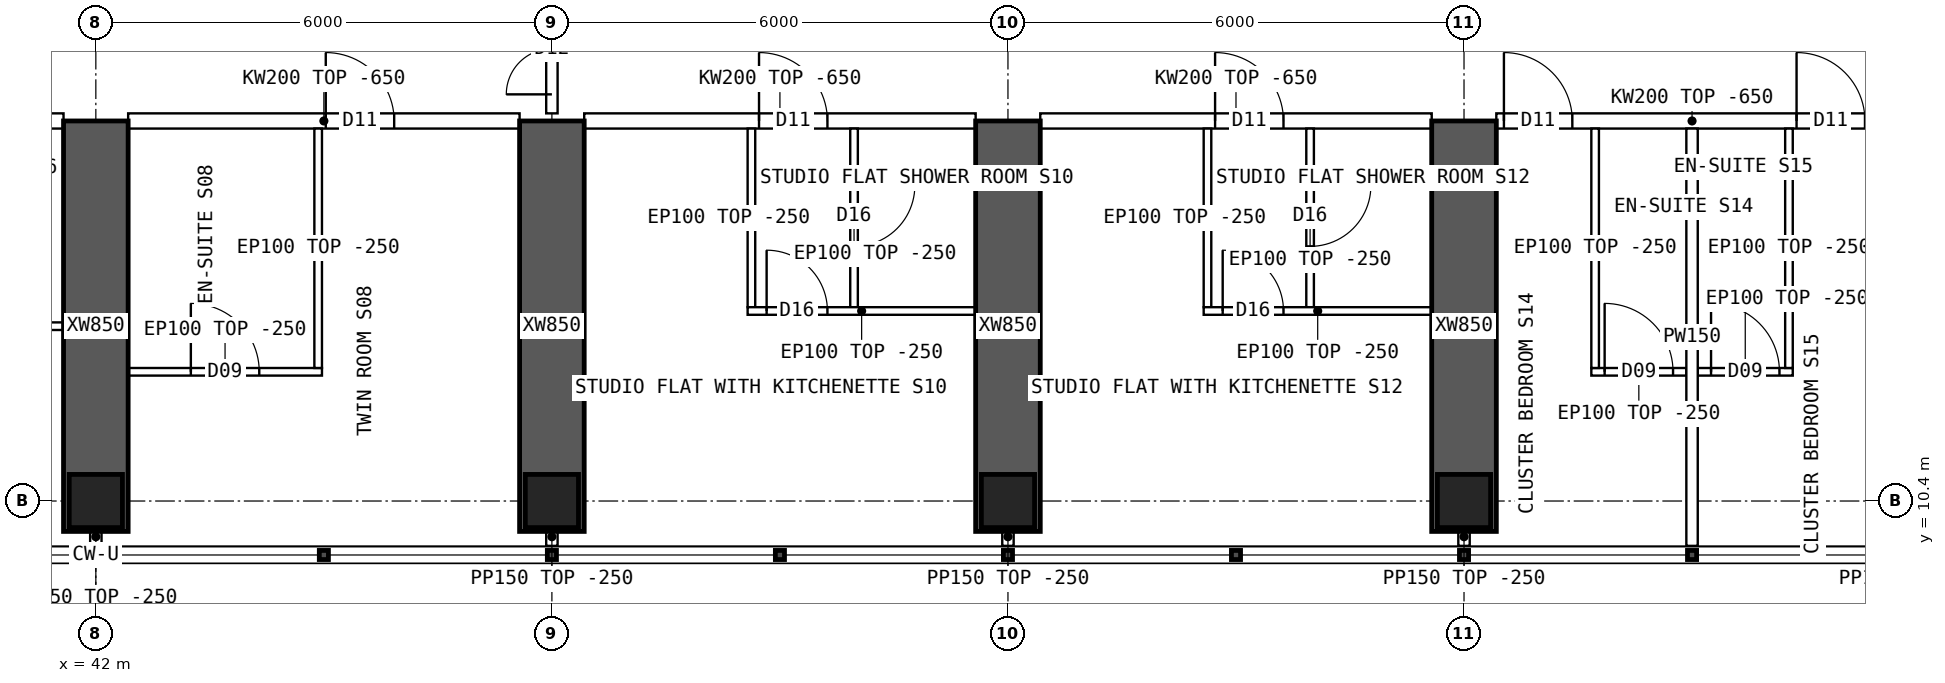
"""IFC4 building model, lengths in metres.
Left out: names, types, materials, properties, quantities, classifications, styles, units other than length and angle.
Written with IfcOpenShell. Run it as: python <this file> out.ifc"""

import sys

from ifc_helpers import new_model, si_unit, direction, frame, frame_2d, origin, origin_2d, place, context, subcontext, project, spatial, polyline, rectangle, hollow_rectangle, outline, extrude, element, fill, save


model = new_model("IFC4")
c1 = context("Model", 3, precision=1e-05, world=origin(), true_north=direction((0.0, 1.0)))
c2 = subcontext(c1, "Body", "Model", "MODEL_VIEW")
j1 = project(units=[si_unit("LENGTHUNIT", "METRE"), si_unit("PLANEANGLEUNIT", "RADIAN")], contexts=[c1])
p1 = place(None, origin())
s1 = spatial("IfcSite", under=j1, at=p1, CompositionType="ELEMENT")
p2 = place(p1, origin())
s2 = spatial("IfcBuilding", under=s1, at=p2, CompositionType="ELEMENT")
p3 = place(p2, frame((0.0, 0.0, 186.1)))
s3 = spatial("IfcBuildingStorey", under=s2, at=p3, CompositionType="ELEMENT", Elevation=186.1)
for number, where, z_axis, x_axis in (
    (1, (42.0, 10.4, 0.0), (0.0, 0.0, 1.0), (1.0, 0.0, 0.0)),
    (2, (48.0, 10.4, 0.0), (0.0, 0.0, 1.0), (1.0, 0.0, 0.0)),
    (3, (54.0, 10.4, 0.0), (0.0, 0.0, 1.0), (1.0, 0.0, 0.0)),
    (4, (60.0, 10.4, 0.0), (0.0, 0.0, 1.0), (1.0, 0.0, 0.0)),
):
    element("IfcColumn", number, at=place(p3, frame(where, z_axis=z_axis, x_axis=x_axis)), inside=s3, PredefinedType="COLUMN", context=c2, shape_type="SweptSolid", body=[
        extrude(hollow_rectangle(XDim=0.7, YDim=0.7, WallThickness=0.07, at=origin_2d()), origin(), (0.0, 0.0, 1.0), 3.75),
    ])
for number, where, z_axis, x_axis in (
    (5, (42.0, 10.0, 0.0), (0.0, 0.0, 1.0), (0.0, 1.0, 0.0)),
    (6, (48.0, 10.0, 0.0), (0.0, 0.0, 1.0), (0.0, 1.0, 0.0)),
    (7, (54.0, 10.0, 0.0), (0.0, 0.0, 1.0), (0.0, 1.0, 0.0)),
    (8, (60.0, 10.0, 0.0), (0.0, 0.0, 1.0), (0.0, 1.0, 0.0)),
):
    element("IfcWall", number, at=place(p3, frame(where, z_axis=z_axis, x_axis=x_axis)), inside=s3, PredefinedType="SHEAR", context=c2, shape_type="SweptSolid", body=[
        extrude(rectangle(XDim=5.4, YDim=0.85, at=frame_2d((2.7, 0.0))), origin(), (0.0, 0.0, 1.0), 3.75),
    ])
p4 = place(p3, frame((36.425, 15.4, 0.0), z_axis=(0.0, 0.0, 1.0), x_axis=(1.0, 0.0, 0.0)))
e9 = element("IfcWall", 9, at=p4, inside=s3, PredefinedType="SOLIDWALL", context=c2, shape_type="SweptSolid", body=[
    extrude(outline(polyline([(0.0, 0.0), (5.15, 0.0), (5.15, 3.1), (0.0, 3.1), (0.0, 0.0)])), frame((0.0, 0.1, 0.0), z_axis=(0.0, -1.0, 0.0), x_axis=(1.0, 0.0, 0.0)), (0.0, 0.0, 1.0), 0.2),
])
p5 = place(p4, frame((0.3, 0.0, 0.0)))
e10 = element("IfcOpeningElement", 10, at=p5, cuts=e9, PredefinedType="OPENING", context=c2, shape_type="SweptSolid", body=[
    extrude(rectangle(XDim=1.0, YDim=2.1, at=frame_2d((0.5, 1.05))), frame((0.0, 0.11, 0.0), z_axis=(0.0, -1.0, 0.0), x_axis=(1.0, 0.0, 0.0)), (0.0, 0.0, 1.0), 0.22),
])
p6 = place(p3, frame((42.425, 15.4, 0.0), z_axis=(0.0, 0.0, 1.0), x_axis=(1.0, 0.0, 0.0)))
e11 = element("IfcWall", 11, at=p6, inside=s3, PredefinedType="SOLIDWALL", context=c2, shape_type="SweptSolid", body=[
    extrude(outline(polyline([(0.0, 0.0), (5.15, 0.0), (5.15, 3.1), (0.0, 3.1), (0.0, 0.0)])), frame((0.0, 0.1, 0.0), z_axis=(0.0, -1.0, 0.0), x_axis=(1.0, 0.0, 0.0)), (0.0, 0.0, 1.0), 0.2),
])
p7 = place(p6, frame((2.6, 0.0, 0.0)))
e12 = element("IfcOpeningElement", 12, at=p7, cuts=e11, PredefinedType="OPENING", context=c2, shape_type="SweptSolid", body=[
    extrude(rectangle(XDim=0.9, YDim=2.1, at=frame_2d((0.45, 1.05))), frame((0.0, 0.11, 0.0), z_axis=(0.0, -1.0, 0.0), x_axis=(1.0, 0.0, 0.0)), (0.0, 0.0, 1.0), 0.22),
])
p8 = place(p3, frame((48.425, 15.4, 0.0), z_axis=(0.0, 0.0, 1.0), x_axis=(1.0, 0.0, 0.0)))
e13 = element("IfcWall", 13, at=p8, inside=s3, PredefinedType="SOLIDWALL", context=c2, shape_type="SweptSolid", body=[
    extrude(outline(polyline([(0.0, 0.0), (5.15, 0.0), (5.15, 3.1), (0.0, 3.1), (0.0, 0.0)])), frame((0.0, 0.1, 0.0), z_axis=(0.0, -1.0, 0.0), x_axis=(1.0, 0.0, 0.0)), (0.0, 0.0, 1.0), 0.2),
])
p9 = place(p8, frame((2.3, 0.0, 0.0)))
e14 = element("IfcOpeningElement", 14, at=p9, cuts=e13, PredefinedType="OPENING", context=c2, shape_type="SweptSolid", body=[
    extrude(rectangle(XDim=0.9, YDim=2.1, at=frame_2d((0.45, 1.05))), frame((0.0, 0.11, 0.0), z_axis=(0.0, -1.0, 0.0), x_axis=(1.0, 0.0, 0.0)), (0.0, 0.0, 1.0), 0.22),
])
p10 = place(p3, frame((54.425, 15.4, 0.0), z_axis=(0.0, 0.0, 1.0), x_axis=(1.0, 0.0, 0.0)))
e15 = element("IfcWall", 15, at=p10, inside=s3, PredefinedType="SOLIDWALL", context=c2, shape_type="SweptSolid", body=[
    extrude(outline(polyline([(0.0, 0.0), (5.15, 0.0), (5.15, 3.1), (0.0, 3.1), (0.0, 0.0)])), frame((0.0, 0.1, 0.0), z_axis=(0.0, -1.0, 0.0), x_axis=(1.0, 0.0, 0.0)), (0.0, 0.0, 1.0), 0.2),
])
p11 = place(p10, frame((2.3, 0.0, 0.0)))
e16 = element("IfcOpeningElement", 16, at=p11, cuts=e15, PredefinedType="OPENING", context=c2, shape_type="SweptSolid", body=[
    extrude(rectangle(XDim=0.9, YDim=2.1, at=frame_2d((0.45, 1.05))), frame((0.0, 0.11, 0.0), z_axis=(0.0, -1.0, 0.0), x_axis=(1.0, 0.0, 0.0)), (0.0, 0.0, 1.0), 0.22),
])
p12 = place(p3, frame((60.425, 15.4, 0.0), z_axis=(0.0, 0.0, 1.0), x_axis=(1.0, 0.0, 0.0)))
e17 = element("IfcWall", 17, at=p12, inside=s3, PredefinedType="SOLIDWALL", context=c2, shape_type="SweptSolid", body=[
    extrude(outline(polyline([(0.0, 0.0), (5.15, 0.0), (5.15, 3.1), (0.0, 3.1), (0.0, 0.0)])), frame((0.0, 0.1, 0.0), z_axis=(0.0, -1.0, 0.0), x_axis=(1.0, 0.0, 0.0)), (0.0, 0.0, 1.0), 0.2),
])
p13 = place(p12, frame((0.1, 0.0, 0.0)))
e18 = element("IfcOpeningElement", 18, at=p13, cuts=e17, PredefinedType="OPENING", context=c2, shape_type="SweptSolid", body=[
    extrude(rectangle(XDim=0.9, YDim=2.1, at=frame_2d((0.45, 1.05))), frame((0.0, 0.11, 0.0), z_axis=(0.0, -1.0, 0.0), x_axis=(1.0, 0.0, 0.0)), (0.0, 0.0, 1.0), 0.22),
])
p14 = place(p12, frame((3.95, 0.0, 0.0)))
e19 = element("IfcOpeningElement", 19, at=p14, cuts=e17, PredefinedType="OPENING", context=c2, shape_type="SweptSolid", body=[
    extrude(rectangle(XDim=0.9, YDim=2.1, at=frame_2d((0.45, 1.05))), frame((0.0, 0.11, 0.0), z_axis=(0.0, -1.0, 0.0), x_axis=(1.0, 0.0, 0.0)), (0.0, 0.0, 1.0), 0.22),
])
p15 = place(p3, frame((38.925, 12.7, 0.0), z_axis=(0.0, 0.0, 1.0), x_axis=(1.0, 0.0, 0.0)))
e20 = element("IfcWall", 20, at=p15, inside=s3, PredefinedType="PARTITIONING", context=c2, shape_type="SweptSolid", body=[
    extrude(rectangle(XDim=2.65, YDim=0.1, at=frame_2d((1.325, 0.0))), origin(), (0.0, 0.0, 1.0), 3.5),
])
p16 = place(p3, frame((44.975, 12.1, 0.0), z_axis=(0.0, 0.0, 1.0), x_axis=(-1.0, 0.0, 0.0)))
e21 = element("IfcWall", 21, at=p16, inside=s3, PredefinedType="PARTITIONING", context=c2, shape_type="SweptSolid", body=[
    extrude(rectangle(XDim=2.55, YDim=0.1, at=frame_2d((1.275, 0.0))), origin(), (0.0, 0.0, 1.0), 3.5),
])
p17 = place(p16, frame((0.825, 0.0, 0.0)))
e22 = element("IfcOpeningElement", 22, at=p17, cuts=e21, PredefinedType="OPENING", context=c2, shape_type="SweptSolid", body=[
    extrude(rectangle(XDim=0.9, YDim=2.1, at=frame_2d((0.45, 1.05))), frame((0.0, 0.06, 0.0), z_axis=(0.0, -1.0, 0.0), x_axis=(1.0, 0.0, 0.0)), (0.0, 0.0, 1.0), 0.12),
])
p18 = place(p3, frame((44.925, 12.15, 0.0), z_axis=(0.0, 0.0, 1.0), x_axis=(0.0, 1.0, 0.0)))
e23 = element("IfcWall", 23, at=p18, inside=s3, PredefinedType="PARTITIONING", context=c2, shape_type="SweptSolid", body=[
    extrude(outline(polyline([(0.0, 0.0), (3.15, 0.0), (3.15, 3.1), (3.102, 3.1), (3.1, 3.5), (0.0, 3.5), (0.0, 0.0)])), frame((0.0, 0.05, 0.0), z_axis=(0.0, -1.0, 0.0), x_axis=(1.0, 0.0, 0.0)), (0.0, 0.0, 1.0), 0.1),
])
p19 = place(p3, frame((53.575, 12.9, 0.0), z_axis=(0.0, 0.0, 1.0), x_axis=(-1.0, 0.0, 0.0)))
e24 = element("IfcWall", 24, at=p19, inside=s3, PredefinedType="PARTITIONING", context=c2, shape_type="SweptSolid", body=[
    extrude(rectangle(XDim=3.0, YDim=0.1, at=frame_2d((1.5, 0.0))), origin(), (0.0, 0.0, 1.0), 3.5),
])
p20 = place(p19, frame((1.95, 0.0, 0.0)))
e25 = element("IfcOpeningElement", 25, at=p20, cuts=e24, PredefinedType="OPENING", context=c2, shape_type="SweptSolid", body=[
    extrude(rectangle(XDim=0.8, YDim=2.1, at=frame_2d((0.4, 1.05))), frame((0.0, 0.06, 0.0), z_axis=(0.0, -1.0, 0.0), x_axis=(1.0, 0.0, 0.0)), (0.0, 0.0, 1.0), 0.12),
])
p21 = place(p3, frame((50.625, 12.95, 0.0), z_axis=(0.0, 0.0, 1.0), x_axis=(0.0, 1.0, 0.0)))
e26 = element("IfcWall", 26, at=p21, inside=s3, PredefinedType="PARTITIONING", context=c2, shape_type="SweptSolid", body=[
    extrude(outline(polyline([(0.0, 0.0), (2.35, 0.0), (2.35, 3.1), (2.302, 3.1), (2.3, 3.5), (0.0, 3.5), (0.0, 0.0)])), frame((0.0, 0.05, 0.0), z_axis=(0.0, -1.0, 0.0), x_axis=(1.0, 0.0, 0.0)), (0.0, 0.0, 1.0), 0.1),
])
p22 = place(p3, frame((51.975, 12.95, 0.0), z_axis=(0.0, 0.0, 1.0), x_axis=(0.0, 1.0, 0.0)))
e27 = element("IfcWall", 27, at=p22, inside=s3, PredefinedType="PARTITIONING", context=c2, shape_type="SweptSolid", body=[
    extrude(outline(polyline([(0.0, 0.0), (2.35, 0.0), (2.35, 3.1), (2.302, 3.1), (2.3, 3.5), (0.0, 3.5), (0.0, 0.0)])), frame((0.0, 0.05, 0.0), z_axis=(0.0, -1.0, 0.0), x_axis=(1.0, 0.0, 0.0)), (0.0, 0.0, 1.0), 0.1),
])
p23 = place(p22, frame((0.8, 0.0, 0.0)))
e28 = element("IfcOpeningElement", 28, at=p23, cuts=e27, PredefinedType="OPENING", context=c2, shape_type="SweptSolid", body=[
    extrude(rectangle(XDim=0.8, YDim=2.1, at=frame_2d((0.4, 1.05))), frame((0.0, 0.06, 0.0), z_axis=(0.0, -1.0, 0.0), x_axis=(1.0, 0.0, 0.0)), (0.0, 0.0, 1.0), 0.12),
])
p24 = place(p3, frame((59.575, 12.9, 0.0), z_axis=(0.0, 0.0, 1.0), x_axis=(-1.0, 0.0, 0.0)))
e29 = element("IfcWall", 29, at=p24, inside=s3, PredefinedType="PARTITIONING", context=c2, shape_type="SweptSolid", body=[
    extrude(rectangle(XDim=3.0, YDim=0.1, at=frame_2d((1.5, 0.0))), origin(), (0.0, 0.0, 1.0), 3.5),
])
p25 = place(p24, frame((1.95, 0.0, 0.0)))
e30 = element("IfcOpeningElement", 30, at=p25, cuts=e29, PredefinedType="OPENING", context=c2, shape_type="SweptSolid", body=[
    extrude(rectangle(XDim=0.8, YDim=2.1, at=frame_2d((0.4, 1.05))), frame((0.0, 0.06, 0.0), z_axis=(0.0, -1.0, 0.0), x_axis=(1.0, 0.0, 0.0)), (0.0, 0.0, 1.0), 0.12),
])
p26 = place(p3, frame((56.625, 12.95, 0.0), z_axis=(0.0, 0.0, 1.0), x_axis=(0.0, 1.0, 0.0)))
e31 = element("IfcWall", 31, at=p26, inside=s3, PredefinedType="PARTITIONING", context=c2, shape_type="SweptSolid", body=[
    extrude(outline(polyline([(0.0, 0.0), (2.35, 0.0), (2.35, 3.1), (2.302, 3.1), (2.3, 3.5), (0.0, 3.5), (0.0, 0.0)])), frame((0.0, 0.05, 0.0), z_axis=(0.0, -1.0, 0.0), x_axis=(1.0, 0.0, 0.0)), (0.0, 0.0, 1.0), 0.1),
])
p27 = place(p3, frame((57.975, 12.95, 0.0), z_axis=(0.0, 0.0, 1.0), x_axis=(0.0, 1.0, 0.0)))
e32 = element("IfcWall", 32, at=p27, inside=s3, PredefinedType="PARTITIONING", context=c2, shape_type="SweptSolid", body=[
    extrude(outline(polyline([(0.0, 0.0), (2.35, 0.0), (2.35, 3.1), (2.302, 3.1), (2.3, 3.5), (0.0, 3.5), (0.0, 0.0)])), frame((0.0, 0.05, 0.0), z_axis=(0.0, -1.0, 0.0), x_axis=(1.0, 0.0, 0.0)), (0.0, 0.0, 1.0), 0.1),
])
p28 = place(p27, frame((0.8, 0.0, 0.0)))
e33 = element("IfcOpeningElement", 33, at=p28, cuts=e32, PredefinedType="OPENING", context=c2, shape_type="SweptSolid", body=[
    extrude(rectangle(XDim=0.8, YDim=2.1, at=frame_2d((0.4, 1.05))), frame((0.0, 0.06, 0.0), z_axis=(0.0, -1.0, 0.0), x_axis=(1.0, 0.0, 0.0)), (0.0, 0.0, 1.0), 0.12),
])
p29 = place(p3, frame((63.0, 9.81, 0.0), z_axis=(0.0, 0.0, 1.0), x_axis=(0.0, 1.0, 0.0)))
e34 = element("IfcWall", 34, at=p29, inside=s3, PredefinedType="PARTITIONING", context=c2, shape_type="SweptSolid", body=[
    extrude(outline(polyline([(0.0, 0.0), (5.49, 0.0), (5.49, 3.1), (5.442, 3.1), (5.44, 3.5), (0.792, 3.5), (0.79, 3.1), (0.392, 3.1), (0.39, 3.5), (0.0, 3.5), (0.0, 0.0)])), frame((0.0, 0.075, 0.0), z_axis=(0.0, -1.0, 0.0), x_axis=(1.0, 0.0, 0.0)), (0.0, 0.0, 1.0), 0.15),
])
p30 = place(p3, frame((62.925, 12.1, 0.0), z_axis=(0.0, 0.0, 1.0), x_axis=(-1.0, 0.0, 0.0)))
e35 = element("IfcWall", 35, at=p30, inside=s3, PredefinedType="PARTITIONING", context=c2, shape_type="SweptSolid", body=[
    extrude(rectangle(XDim=1.25, YDim=0.1, at=frame_2d((0.625, 0.0))), origin(), (0.0, 0.0, 1.0), 3.5),
])
p31 = place(p30, frame((0.175, 0.0, 0.0)))
e36 = element("IfcOpeningElement", 36, at=p31, cuts=e35, PredefinedType="OPENING", context=c2, shape_type="SweptSolid", body=[
    extrude(rectangle(XDim=0.9, YDim=2.1, at=frame_2d((0.45, 1.05))), frame((0.0, 0.06, 0.0), z_axis=(0.0, -1.0, 0.0), x_axis=(1.0, 0.0, 0.0)), (0.0, 0.0, 1.0), 0.12),
])
p32 = place(p3, frame((61.725, 12.15, 0.0), z_axis=(0.0, 0.0, 1.0), x_axis=(0.0, 1.0, 0.0)))
e37 = element("IfcWall", 37, at=p32, inside=s3, PredefinedType="PARTITIONING", context=c2, shape_type="SweptSolid", body=[
    extrude(outline(polyline([(0.0, 0.0), (3.15, 0.0), (3.15, 3.1), (3.102, 3.1), (3.1, 3.5), (0.0, 3.5), (0.0, 0.0)])), frame((0.0, 0.05, 0.0), z_axis=(0.0, -1.0, 0.0), x_axis=(1.0, 0.0, 0.0)), (0.0, 0.0, 1.0), 0.1),
])
p33 = place(p3, frame((64.325, 12.1, 0.0), z_axis=(0.0, 0.0, 1.0), x_axis=(-1.0, 0.0, 0.0)))
e38 = element("IfcWall", 38, at=p33, inside=s3, PredefinedType="PARTITIONING", context=c2, shape_type="SweptSolid", body=[
    extrude(rectangle(XDim=1.25, YDim=0.1, at=frame_2d((0.625, 0.0))), origin(), (0.0, 0.0, 1.0), 3.5),
])
p34 = place(p33, frame((0.175, 0.0, 0.0)))
e39 = element("IfcOpeningElement", 39, at=p34, cuts=e38, PredefinedType="OPENING", context=c2, shape_type="SweptSolid", body=[
    extrude(rectangle(XDim=0.9, YDim=2.1, at=frame_2d((0.45, 1.05))), frame((0.0, 0.06, 0.0), z_axis=(0.0, -1.0, 0.0), x_axis=(1.0, 0.0, 0.0)), (0.0, 0.0, 1.0), 0.12),
])
p35 = place(p3, frame((64.275, 12.15, 0.0), z_axis=(0.0, 0.0, 1.0), x_axis=(0.0, 1.0, 0.0)))
e40 = element("IfcWall", 40, at=p35, inside=s3, PredefinedType="PARTITIONING", context=c2, shape_type="SweptSolid", body=[
    extrude(outline(polyline([(0.0, 0.0), (3.15, 0.0), (3.15, 3.1), (3.102, 3.1), (3.1, 3.5), (0.0, 3.5), (0.0, 0.0)])), frame((0.0, 0.05, 0.0), z_axis=(0.0, -1.0, 0.0), x_axis=(1.0, 0.0, 0.0)), (0.0, 0.0, 1.0), 0.1),
])
p36 = place(p3, frame((48.0, 15.5, 0.0), z_axis=(0.0, 0.0, 1.0), x_axis=(0.0, 1.0, 0.0)))
e41 = element("IfcWall", 41, at=p36, inside=s3, PredefinedType="PARTITIONING", context=c2, shape_type="SweptSolid", body=[
    extrude(outline(polyline([(0.0, 0.0), (1.7, 0.0), (1.7, 3.1), (0.0, 3.1), (0.0, 0.0)])), frame((0.0, 0.075, 0.0), z_axis=(0.0, -1.0, 0.0), x_axis=(1.0, 0.0, 0.0)), (0.0, 0.0, 1.0), 0.15),
])
p37 = place(p36, frame((0.25, 0.0, 0.0)))
e42 = element("IfcOpeningElement", 42, at=p37, cuts=e41, PredefinedType="OPENING", context=c2, shape_type="SweptSolid", body=[
    extrude(rectangle(XDim=1.2, YDim=2.1, at=frame_2d((0.6, 1.05))), frame((0.0, 0.085, 0.0), z_axis=(0.0, -1.0, 0.0), x_axis=(1.0, 0.0, 0.0)), (0.0, 0.0, 1.0), 0.17),
])
for number, where, z_axis, x_axis in (
    (43, (42.0, 10.05, 0.0), (0.0, 0.0, 1.0), (0.0, -1.0, 0.0)),
    (44, (48.0, 10.05, 0.0), (0.0, 0.0, 1.0), (0.0, -1.0, 0.0)),
    (45, (54.0, 10.05, 0.0), (0.0, 0.0, 1.0), (0.0, -1.0, 0.0)),
    (46, (60.0, 10.05, 0.0), (0.0, 0.0, 1.0), (0.0, -1.0, 0.0)),
):
    element("IfcWall", number, at=place(p3, frame(where, z_axis=z_axis, x_axis=x_axis)), inside=s3, PredefinedType="PARTITIONING", context=c2, shape_type="SweptSolid", body=[
        extrude(rectangle(XDim=0.24, YDim=0.15, at=frame_2d((0.12, 0.0))), origin(), (0.0, 0.0, 1.0), 3.5),
    ])
p38 = place(p17, origin())
e47 = element("IfcDoor", 47, at=p38, inside=s3, OperationType="SINGLE_SWING_RIGHT", PredefinedType="DOOR", context=c2, shape_type="SweptSolid", body=[
    extrude(rectangle(XDim=0.9, YDim=2.1, at=frame_2d((0.45, 1.05))), frame((0.0, 0.025, 0.0), z_axis=(0.0, -1.0, 0.0), x_axis=(1.0, 0.0, 0.0)), (0.0, 0.0, 1.0), 0.05),
])
fill(e22, e47)
p39 = place(p7, origin())
e48 = element("IfcDoor", 48, at=p39, inside=s3, OperationType="SINGLE_SWING_LEFT", PredefinedType="DOOR", context=c2, shape_type="SweptSolid", body=[
    extrude(rectangle(XDim=0.9, YDim=2.1, at=frame_2d((0.45, 1.05))), frame((0.0, 0.025, 0.0), z_axis=(0.0, -1.0, 0.0), x_axis=(1.0, 0.0, 0.0)), (0.0, 0.0, 1.0), 0.05),
])
fill(e12, e48)
p40 = place(p20, origin())
e49 = element("IfcDoor", 49, at=p40, inside=s3, OperationType="SINGLE_SWING_RIGHT", PredefinedType="DOOR", context=c2, shape_type="SweptSolid", body=[
    extrude(rectangle(XDim=0.8, YDim=2.1, at=frame_2d((0.4, 1.05))), frame((0.0, 0.025, 0.0), z_axis=(0.0, -1.0, 0.0), x_axis=(1.0, 0.0, 0.0)), (0.0, 0.0, 1.0), 0.05),
])
fill(e25, e49)
p41 = place(p23, origin())
e50 = element("IfcDoor", 50, at=p41, inside=s3, OperationType="SINGLE_SWING_RIGHT", PredefinedType="DOOR", context=c2, shape_type="SweptSolid", body=[
    extrude(rectangle(XDim=0.8, YDim=2.1, at=frame_2d((0.4, 1.05))), frame((0.0, 0.025, 0.0), z_axis=(0.0, -1.0, 0.0), x_axis=(1.0, 0.0, 0.0)), (0.0, 0.0, 1.0), 0.05),
])
fill(e28, e50)
p42 = place(p9, origin())
e51 = element("IfcDoor", 51, at=p42, inside=s3, OperationType="SINGLE_SWING_LEFT", PredefinedType="DOOR", context=c2, shape_type="SweptSolid", body=[
    extrude(rectangle(XDim=0.9, YDim=2.1, at=frame_2d((0.45, 1.05))), frame((0.0, 0.025, 0.0), z_axis=(0.0, -1.0, 0.0), x_axis=(1.0, 0.0, 0.0)), (0.0, 0.0, 1.0), 0.05),
])
fill(e14, e51)
p43 = place(p25, origin())
e52 = element("IfcDoor", 52, at=p43, inside=s3, OperationType="SINGLE_SWING_RIGHT", PredefinedType="DOOR", context=c2, shape_type="SweptSolid", body=[
    extrude(rectangle(XDim=0.8, YDim=2.1, at=frame_2d((0.4, 1.05))), frame((0.0, 0.025, 0.0), z_axis=(0.0, -1.0, 0.0), x_axis=(1.0, 0.0, 0.0)), (0.0, 0.0, 1.0), 0.05),
])
fill(e30, e52)
p44 = place(p28, origin())
e53 = element("IfcDoor", 53, at=p44, inside=s3, OperationType="SINGLE_SWING_RIGHT", PredefinedType="DOOR", context=c2, shape_type="SweptSolid", body=[
    extrude(rectangle(XDim=0.8, YDim=2.1, at=frame_2d((0.4, 1.05))), frame((0.0, 0.025, 0.0), z_axis=(0.0, -1.0, 0.0), x_axis=(1.0, 0.0, 0.0)), (0.0, 0.0, 1.0), 0.05),
])
fill(e33, e53)
p45 = place(p11, origin())
e54 = element("IfcDoor", 54, at=p45, inside=s3, OperationType="SINGLE_SWING_LEFT", PredefinedType="DOOR", context=c2, shape_type="SweptSolid", body=[
    extrude(rectangle(XDim=0.9, YDim=2.1, at=frame_2d((0.45, 1.05))), frame((0.0, 0.025, 0.0), z_axis=(0.0, -1.0, 0.0), x_axis=(1.0, 0.0, 0.0)), (0.0, 0.0, 1.0), 0.05),
])
fill(e16, e54)
p46 = place(p31, origin())
e55 = element("IfcDoor", 55, at=p46, inside=s3, OperationType="SINGLE_SWING_RIGHT", PredefinedType="DOOR", context=c2, shape_type="SweptSolid", body=[
    extrude(rectangle(XDim=0.9, YDim=2.1, at=frame_2d((0.45, 1.05))), frame((0.0, 0.025, 0.0), z_axis=(0.0, -1.0, 0.0), x_axis=(1.0, 0.0, 0.0)), (0.0, 0.0, 1.0), 0.05),
])
fill(e36, e55)
p47 = place(p13, origin())
e56 = element("IfcDoor", 56, at=p47, inside=s3, OperationType="SINGLE_SWING_LEFT", PredefinedType="DOOR", context=c2, shape_type="SweptSolid", body=[
    extrude(rectangle(XDim=0.9, YDim=2.1, at=frame_2d((0.45, 1.05))), frame((0.0, 0.025, 0.0), z_axis=(0.0, -1.0, 0.0), x_axis=(1.0, 0.0, 0.0)), (0.0, 0.0, 1.0), 0.05),
])
fill(e18, e56)
p48 = place(p34, origin())
e57 = element("IfcDoor", 57, at=p48, inside=s3, OperationType="SINGLE_SWING_RIGHT", PredefinedType="DOOR", context=c2, shape_type="SweptSolid", body=[
    extrude(rectangle(XDim=0.9, YDim=2.1, at=frame_2d((0.45, 1.05))), frame((0.0, 0.025, 0.0), z_axis=(0.0, -1.0, 0.0), x_axis=(1.0, 0.0, 0.0)), (0.0, 0.0, 1.0), 0.05),
])
fill(e39, e57)
p49 = place(p14, origin())
e58 = element("IfcDoor", 58, at=p49, inside=s3, OperationType="SINGLE_SWING_LEFT", PredefinedType="DOOR", context=c2, shape_type="SweptSolid", body=[
    extrude(rectangle(XDim=0.9, YDim=2.1, at=frame_2d((0.45, 1.05))), frame((0.0, 0.025, 0.0), z_axis=(0.0, -1.0, 0.0), x_axis=(1.0, 0.0, 0.0)), (0.0, 0.0, 1.0), 0.05),
])
fill(e19, e58)
p50 = place(p37, origin())
e59 = element("IfcDoor", 59, at=p50, inside=s3, OperationType="DOUBLE_DOOR_SINGLE_SWING", PredefinedType="DOOR", context=c2, shape_type="SweptSolid", body=[
    extrude(rectangle(XDim=1.2, YDim=2.1, at=frame_2d((0.6, 1.05))), frame((0.0, 0.025, 0.0), z_axis=(0.0, -1.0, 0.0), x_axis=(1.0, 0.0, 0.0)), (0.0, 0.0, 1.0), 0.05),
])
fill(e42, e59)
save(model, sys.argv[1])
